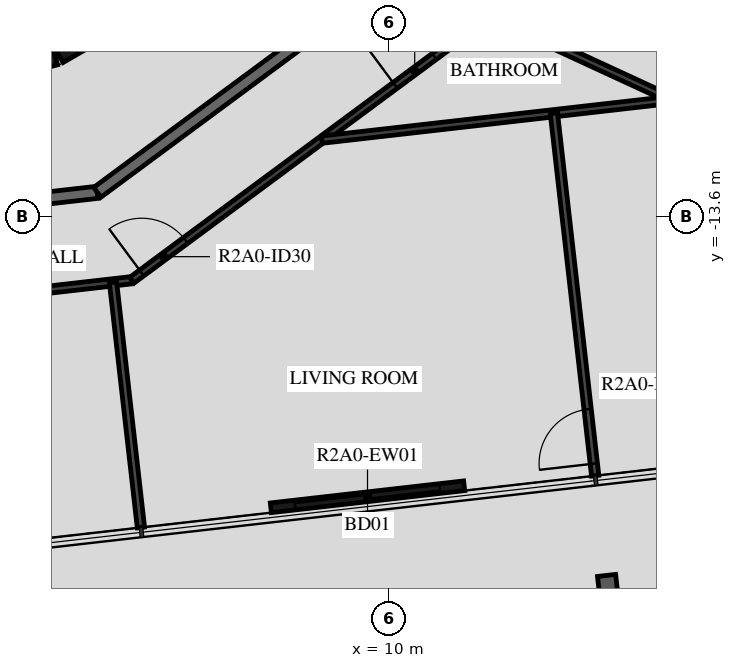
"""IFC4 building model, lengths in metres.
Left out: names, types, materials, properties, quantities, classifications, styles, units other than length and angle.
Written with IfcOpenShell. Run it as: python <this file> out.ifc"""

import sys

from ifc_helpers import new_model, si_unit, direction, frame, frame_2d, origin, origin_2d, place, context, subcontext, project, spatial, rectangle, i_section, extrude, element, fill, save


model = new_model("IFC4")
c1 = context("Model", 3, precision=1e-05, world=origin(), true_north=direction((0.0, 1.0)))
c2 = subcontext(c1, "Body", "Model", "MODEL_VIEW")
j1 = project(units=[si_unit("LENGTHUNIT", "METRE"), si_unit("PLANEANGLEUNIT", "RADIAN")], contexts=[c1])
p1 = place(None, origin())
s1 = spatial("IfcSite", under=j1, at=p1, CompositionType="ELEMENT")
p2 = place(p1, origin())
s2 = spatial("IfcBuilding", under=s1, at=p2, CompositionType="ELEMENT")
p3 = place(p2, frame((0.0, 0.0, 76.7)))
s3 = spatial("IfcBuildingStorey", under=s2, at=p3, CompositionType="ELEMENT", Elevation=76.7)
p4 = place(p3, frame((13.624, -19.944, -0.45), z_axis=(0.0, 0.0, 1.0), x_axis=(-0.993571881569, -0.113202986513, 0.0)))
e1 = element("IfcColumn", 1, at=p4, inside=s3, PredefinedType="COLUMN", context=c2, shape_type="SweptSolid", body=[
    extrude(i_section(OverallWidth=0.3, OverallDepth=0.9, WebThickness=0.019, FlangeThickness=0.035, FilletRadius=0.03, at=origin_2d()), origin(), (0.0, 0.0, 1.0), 3.57),
])
p5 = place(p3, frame((8.052, -18.384, 0.0), z_axis=(0.0, 0.0, 1.0), x_axis=(0.993569997097, 0.113219525124, 0.0)))
e2 = element("IfcWall", 2, at=p5, inside=s3, PredefinedType="STANDARD", context=c2, shape_type="SweptSolid", body=[
    extrude(rectangle(XDim=3.2, YDim=0.16, at=frame_2d((1.6, 0.0))), origin(), (0.0, 0.0, 1.0), 3.12),
])
p6 = place(p5, frame((0.4, 0.0, 0.0)))
e3 = element("IfcOpeningElement", 3, at=p6, cuts=e2, PredefinedType="OPENING", context=c2, shape_type="SweptSolid", body=[
    extrude(rectangle(XDim=2.4, YDim=2.4, at=frame_2d((1.2, 1.2))), frame((0.0, 0.09, 0.0), z_axis=(0.0, -1.0, 0.0), x_axis=(1.0, 0.0, 0.0)), (0.0, 0.0, 1.0), 0.18),
])
p7 = place(p3, frame((1.55, -11.643, 0.0), z_axis=(0.0, 0.0, 1.0), x_axis=(0.965948410781, 0.258734743916, 0.0)))
e4 = element("IfcWall", 4, at=p7, inside=s3, PredefinedType="SHEAR", context=c2, shape_type="SweptSolid", body=[
    extrude(rectangle(XDim=3.033, YDim=0.5, at=frame_2d((1.516, 0.0))), origin(), (0.0, 0.0, 1.0), 3.12),
])
p8 = place(p3, frame((4.51, -10.845, 0.0), z_axis=(0.0, 0.0, 1.0), x_axis=(0.865975092491, 0.500087131594, 0.0)))
e5 = element("IfcWall", 5, at=p8, inside=s3, PredefinedType="SHEAR", context=c2, shape_type="SweptSolid", body=[
    extrude(rectangle(XDim=3.033, YDim=0.5, at=frame_2d((1.516, 0.0))), origin(), (0.0, 0.0, 1.0), 3.12),
])
p9 = place(p8, frame((1.066, 0.0, 0.0)))
e6 = element("IfcOpeningElement", 6, at=p9, cuts=e5, PredefinedType="OPENING", context=c2, shape_type="SweptSolid", body=[
    extrude(rectangle(XDim=0.9, YDim=2.1, at=frame_2d((0.45, 1.05))), frame((0.0, 0.26, 0.0), z_axis=(0.0, -1.0, 0.0), x_axis=(1.0, 0.0, 0.0)), (0.0, 0.0, 1.0), 0.52),
])
p10 = place(p3, frame((-2.096, -14.028, 0.0), z_axis=(0.0, 0.0, 1.0), x_axis=(0.993569170114, 0.113226782163, 0.0)))
e7 = element("IfcWall", 7, at=p10, inside=s3, PredefinedType="STANDARD", context=c2, shape_type="SweptSolid", body=[
    extrude(rectangle(XDim=7.342, YDim=0.2, at=frame_2d((3.671, 0.0))), origin(), (0.0, 0.0, 1.0), 3.12),
])
p11 = place(p10, frame((0.5, 0.0, 0.0)))
e8 = element("IfcOpeningElement", 8, at=p11, cuts=e7, PredefinedType="OPENING", context=c2, shape_type="SweptSolid", body=[
    extrude(rectangle(XDim=1.0, YDim=2.1, at=frame_2d((0.5, 1.05))), frame((0.0, 0.11, 0.0), z_axis=(0.0, -1.0, 0.0), x_axis=(1.0, 0.0, 0.0)), (0.0, 0.0, 1.0), 0.22),
])
p12 = place(p3, frame((5.198, -13.196, 0.0), z_axis=(0.0, 0.0, 1.0), x_axis=(0.803869883159, 0.594805187394, 0.0)))
e9 = element("IfcWall", 9, at=p12, inside=s3, PredefinedType="STANDARD", context=c2, shape_type="SweptSolid", body=[
    extrude(rectangle(XDim=7.342, YDim=0.2, at=frame_2d((3.671, 0.0))), origin(), (0.0, 0.0, 1.0), 3.12),
])
p13 = place(p3, frame((3.138, -14.941, 0.0), z_axis=(0.0, 0.0, 1.0), x_axis=(0.99356355736, 0.113276023437, 0.0)))
e10 = element("IfcWall", 10, at=p13, inside=s3, PredefinedType="PARTITIONING", context=c2, shape_type="SweptSolid", body=[
    extrude(rectangle(XDim=2.647, YDim=0.12, at=frame_2d((1.323, 0.0))), origin(), (0.0, 0.0, 1.0), 3.12),
])
p14 = place(p3, frame((5.767, -14.641, 0.0), z_axis=(0.0, 0.0, 1.0), x_axis=(0.803867427863, 0.594808505673, 0.0)))
e11 = element("IfcWall", 11, at=p14, inside=s3, PredefinedType="PARTITIONING", context=c2, shape_type="SweptSolid", body=[
    extrude(rectangle(XDim=7.316, YDim=0.12, at=frame_2d((3.658, 0.0))), origin(), (0.0, 0.0, 1.0), 3.12),
])
p15 = place(p14, frame((0.2, 0.0, 0.0)))
e12 = element("IfcOpeningElement", 12, at=p15, cuts=e11, PredefinedType="OPENING", context=c2, shape_type="SweptSolid", body=[
    extrude(rectangle(XDim=0.9, YDim=2.1, at=frame_2d((0.45, 1.05))), frame((0.0, 0.07, 0.0), z_axis=(0.0, -1.0, 0.0), x_axis=(1.0, 0.0, 0.0)), (0.0, 0.0, 1.0), 0.14),
])
p16 = place(p14, frame((5.385, 0.0, 0.0)))
e13 = element("IfcOpeningElement", 13, at=p16, cuts=e11, PredefinedType="OPENING", context=c2, shape_type="SweptSolid", body=[
    extrude(rectangle(XDim=0.8, YDim=2.1, at=frame_2d((0.4, 1.05))), frame((0.0, 0.07, 0.0), z_axis=(0.0, -1.0, 0.0), x_axis=(1.0, 0.0, 0.0)), (0.0, 0.0, 1.0), 0.14),
])
p17 = place(p3, frame((11.649, -10.289, 0.0), z_axis=(0.0, 0.0, 1.0), x_axis=(0.9079269461, -0.419128453514, 0.0)))
e14 = element("IfcWall", 14, at=p17, inside=s3, PredefinedType="PARTITIONING", context=c2, shape_type="SweptSolid", body=[
    extrude(rectangle(XDim=3.304, YDim=0.12, at=frame_2d((1.652, 0.0))), origin(), (0.0, 0.0, 1.0), 3.12),
])
p18 = place(p3, frame((5.915, -18.708, 0.0), z_axis=(0.0, 0.0, 1.0), x_axis=(-0.113244511591, 0.993567149515, 0.0)))
e15 = element("IfcWall", 15, at=p18, inside=s3, PredefinedType="PARTITIONING", context=c2, shape_type="SweptSolid", body=[
    extrude(rectangle(XDim=4.057, YDim=0.12, at=frame_2d((2.029, 0.0))), origin(), (0.0, 0.0, 1.0), 2.73),
])
p19 = place(p3, frame((14.649, -11.674, 0.0), z_axis=(0.0, 0.0, 1.0), x_axis=(-0.993573746873, -0.113186613721, 0.0)))
e16 = element("IfcWall", 16, at=p19, inside=s3, PredefinedType="PARTITIONING", context=c2, shape_type="SweptSolid", body=[
    extrude(rectangle(XDim=5.796, YDim=0.12, at=frame_2d((2.898, 0.0))), origin(), (0.0, 0.0, 1.0), 3.12),
])
p20 = place(p3, frame((13.386, -17.857, 0.0), z_axis=(0.0, 0.0, 1.0), x_axis=(-0.113200012983, 0.993572220355, 0.0)))
e17 = element("IfcWall", 17, at=p20, inside=s3, PredefinedType="PARTITIONING", context=c2, shape_type="SweptSolid", body=[
    extrude(rectangle(XDim=6.0, YDim=0.12, at=frame_2d((3.0, 0.0))), origin(), (0.0, 0.0, 1.0), 2.73),
])
p21 = place(p20, frame((0.2, 0.0, 0.0)))
e18 = element("IfcOpeningElement", 18, at=p21, cuts=e17, PredefinedType="OPENING", context=c2, shape_type="SweptSolid", body=[
    extrude(rectangle(XDim=0.9, YDim=2.1, at=frame_2d((0.45, 1.05))), frame((0.0, 0.07, 0.0), z_axis=(0.0, -1.0, 0.0), x_axis=(1.0, 0.0, 0.0)), (0.0, 0.0, 1.0), 0.14),
])
p22 = place(p6, origin())
e19 = element("IfcDoor", 19, at=p22, inside=s3, OperationType="DOUBLE_DOOR_SLIDING", PredefinedType="DOOR", context=c2, shape_type="SweptSolid", body=[
    extrude(rectangle(XDim=2.4, YDim=2.4, at=frame_2d((1.2, 1.2))), frame((0.0, 0.025, 0.0), z_axis=(0.0, -1.0, 0.0), x_axis=(1.0, 0.0, 0.0)), (0.0, 0.0, 1.0), 0.05),
])
fill(e3, e19)
p23 = place(p15, origin())
e20 = element("IfcDoor", 20, at=p23, inside=s3, OperationType="SINGLE_SWING_RIGHT", PredefinedType="DOOR", context=c2, shape_type="SweptSolid", body=[
    extrude(rectangle(XDim=0.9, YDim=2.1, at=frame_2d((0.45, 1.05))), frame((0.0, 0.025, 0.0), z_axis=(0.0, -1.0, 0.0), x_axis=(1.0, 0.0, 0.0)), (0.0, 0.0, 1.0), 0.05),
])
fill(e12, e20)
p24 = place(p16, origin())
e21 = element("IfcDoor", 21, at=p24, inside=s3, OperationType="SINGLE_SWING_RIGHT", PredefinedType="DOOR", context=c2, shape_type="SweptSolid", body=[
    extrude(rectangle(XDim=0.8, YDim=2.1, at=frame_2d((0.4, 1.05))), frame((0.0, 0.025, 0.0), z_axis=(0.0, -1.0, 0.0), x_axis=(1.0, 0.0, 0.0)), (0.0, 0.0, 1.0), 0.05),
])
fill(e13, e21)
p25 = place(p21, origin())
e22 = element("IfcDoor", 22, at=p25, inside=s3, OperationType="SINGLE_SWING_RIGHT", PredefinedType="DOOR", context=c2, shape_type="SweptSolid", body=[
    extrude(rectangle(XDim=0.9, YDim=2.1, at=frame_2d((0.45, 1.05))), frame((0.0, 0.025, 0.0), z_axis=(0.0, -1.0, 0.0), x_axis=(1.0, 0.0, 0.0)), (0.0, 0.0, 1.0), 0.05),
])
fill(e18, e22)
save(model, sys.argv[1])
